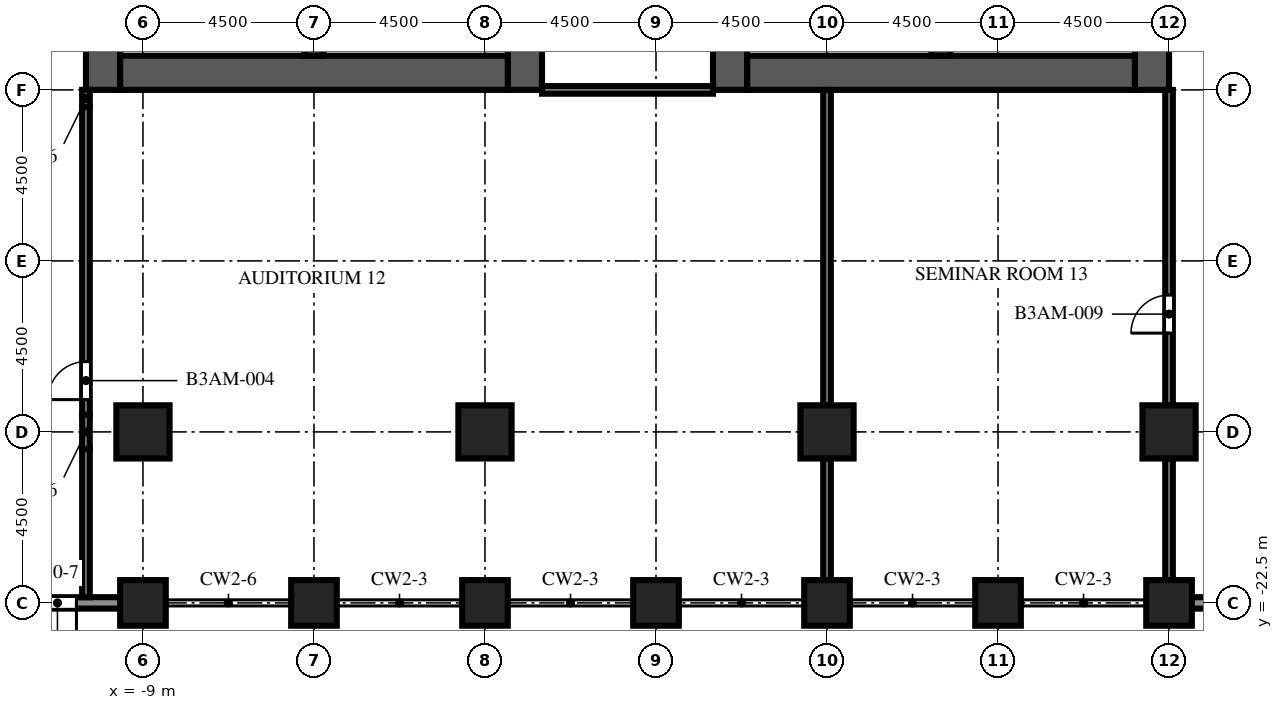
"""IFC4 building model, lengths in metres.
Left out: names, types, materials, properties, quantities, classifications, styles, units other than length and angle.
Written with IfcOpenShell. Run it as: python <this file> out.ifc"""

import sys

from ifc_helpers import new_model, si_unit, direction, frame, frame_2d, origin, origin_2d, place, context, subcontext, project, spatial, rectangle, extrude, element, fill, save


model = new_model("IFC4")
c1 = context("Model", 3, precision=1e-05, world=origin(), true_north=direction((0.0, 1.0)))
c2 = subcontext(c1, "Body", "Model", "MODEL_VIEW")
j1 = project(units=[si_unit("LENGTHUNIT", "METRE"), si_unit("PLANEANGLEUNIT", "RADIAN")], contexts=[c1])
p1 = place(None, origin())
s1 = spatial("IfcSite", under=j1, at=p1, CompositionType="ELEMENT")
p2 = place(p1, origin())
s2 = spatial("IfcBuilding", under=s1, at=p2, CompositionType="ELEMENT")
p3 = place(p2, frame((0.0, 0.0, 110.7)))
s3 = spatial("IfcBuildingStorey", under=s2, at=p3, CompositionType="ELEMENT", Elevation=110.7)
for number, where, z_axis, x_axis in (
    (1, (-9.0, -22.5, 0.0), (0.0, 0.0, 1.0), (1.0, 0.0, 0.0)),
    (2, (-4.5, -22.5, 0.0), (0.0, 0.0, 1.0), (1.0, 0.0, 0.0)),
    (3, (0.0, -22.5, 0.0), (0.0, 0.0, 1.0), (1.0, 0.0, 0.0)),
    (4, (4.5, -22.5, 0.0), (0.0, 0.0, 1.0), (1.0, 0.0, 0.0)),
    (5, (9.0, -22.5, 0.0), (0.0, 0.0, 1.0), (1.0, 0.0, 0.0)),
    (6, (13.5, -22.5, 0.0), (0.0, 0.0, 1.0), (1.0, 0.0, 0.0)),
    (7, (18.0, -22.5, 0.0), (0.0, 0.0, 1.0), (1.0, 0.0, 0.0)),
):
    element("IfcColumn", number, at=place(p3, frame(where, z_axis=z_axis, x_axis=x_axis)), inside=s3, PredefinedType="COLUMN", context=c2, shape_type="SweptSolid", body=[
        extrude(rectangle(XDim=1.2, YDim=1.2, at=origin_2d()), origin(), (0.0, 0.0, 1.0), 6.0),
    ])
p4 = place(p3, frame((-9.0, -18.0, 0.0), z_axis=(0.0, 0.0, 1.0), x_axis=(1.0, 0.0, 0.0)))
e8 = element("IfcColumn", 8, at=p4, inside=s3, PredefinedType="COLUMN", context=c2, shape_type="SweptSolid", body=[
    extrude(rectangle(XDim=1.4, YDim=1.4, at=origin_2d()), origin(), (0.0, 0.0, 1.0), 5.55),
])
for number, where, z_axis, x_axis in (
    (9, (0.0, -18.0, 0.0), (0.0, 0.0, 1.0), (1.0, 0.0, 0.0)),
    (10, (9.0, -18.0, 0.0), (0.0, 0.0, 1.0), (1.0, 0.0, 0.0)),
    (11, (18.0, -18.0, 0.0), (0.0, 0.0, 1.0), (1.0, 0.0, 0.0)),
):
    element("IfcColumn", number, at=place(p3, frame(where, z_axis=z_axis, x_axis=x_axis)), inside=s3, PredefinedType="COLUMN", context=c2, shape_type="SweptSolid", body=[
        extrude(rectangle(XDim=1.4, YDim=1.4, at=origin_2d()), origin(), (0.0, 0.0, 1.0), 6.0),
    ])
p5 = place(p3, frame((-10.05, -9.0, 0.0), z_axis=(0.0, 0.0, 1.0), x_axis=(0.0, 1.0, 0.0)))
e12 = element("IfcWall", 12, at=p5, inside=s3, PredefinedType="SHEAR", context=c2, shape_type="SweptSolid", body=[
    extrude(rectangle(XDim=27.5, YDim=0.9, at=frame_2d((13.75, 0.0))), origin(), (0.0, 0.0, 1.0), 6.0),
])
p6 = place(p5, frame((12.55, 0.0, 0.0)))
e13 = element("IfcOpeningElement", 13, at=p6, cuts=e12, PredefinedType="OPENING", context=c2, shape_type="SweptSolid", body=[
    extrude(rectangle(XDim=2.4, YDim=2.4, at=frame_2d((1.2, 1.2))), frame((0.0, 0.46, 0.0), z_axis=(0.0, -1.0, 0.0), x_axis=(1.0, 0.0, 0.0)), (0.0, 0.0, 1.0), 0.92),
])
p7 = place(p5, frame((6.825, 0.0, 0.0)))
e14 = element("IfcOpeningElement", 14, at=p7, cuts=e12, PredefinedType="OPENING", context=c2, shape_type="SweptSolid", body=[
    extrude(rectangle(XDim=1.2, YDim=2.1, at=frame_2d((0.6, 1.05))), frame((0.0, 0.46, 0.0), z_axis=(0.0, -1.0, 0.0), x_axis=(1.0, 0.0, 0.0)), (0.0, 0.0, 1.0), 0.92),
])
p8 = place(p5, frame((19.475, 0.0, 0.0)))
e15 = element("IfcOpeningElement", 15, at=p8, cuts=e12, PredefinedType="OPENING", context=c2, shape_type="SweptSolid", body=[
    extrude(rectangle(XDim=1.2, YDim=2.1, at=frame_2d((0.6, 1.05))), frame((0.0, 0.46, 0.0), z_axis=(0.0, -1.0, 0.0), x_axis=(1.0, 0.0, 0.0)), (0.0, 0.0, 1.0), 0.92),
])
p9 = place(p3, frame((1.05, -9.0, 0.0), z_axis=(0.0, 0.0, 1.0), x_axis=(0.0, 1.0, 0.0)))
e16 = element("IfcWall", 16, at=p9, inside=s3, PredefinedType="SHEAR", context=c2, shape_type="SweptSolid", body=[
    extrude(rectangle(XDim=27.5, YDim=0.9, at=frame_2d((13.75, 0.0))), origin(), (0.0, 0.0, 1.0), 6.0),
])
p10 = place(p9, frame((12.55, 0.0, 0.0)))
e17 = element("IfcOpeningElement", 17, at=p10, cuts=e16, PredefinedType="OPENING", context=c2, shape_type="SweptSolid", body=[
    extrude(rectangle(XDim=2.4, YDim=2.4, at=frame_2d((1.2, 1.2))), frame((0.0, 0.46, 0.0), z_axis=(0.0, -1.0, 0.0), x_axis=(1.0, 0.0, 0.0)), (0.0, 0.0, 1.0), 0.92),
])
p11 = place(p9, frame((3.975, 0.0, 0.0)))
e18 = element("IfcOpeningElement", 18, at=p11, cuts=e16, PredefinedType="OPENING", context=c2, shape_type="SweptSolid", body=[
    extrude(rectangle(XDim=1.2, YDim=2.1, at=frame_2d((0.6, 1.05))), frame((0.0, 0.46, 0.0), z_axis=(0.0, -1.0, 0.0), x_axis=(1.0, 0.0, 0.0)), (0.0, 0.0, 1.0), 0.92),
])
p12 = place(p9, frame((19.485, 0.0, 0.0)))
e19 = element("IfcOpeningElement", 19, at=p12, cuts=e16, PredefinedType="OPENING", context=c2, shape_type="SweptSolid", body=[
    extrude(rectangle(XDim=1.0, YDim=2.1, at=frame_2d((0.5, 1.05))), frame((0.0, 0.46, 0.0), z_axis=(0.0, -1.0, 0.0), x_axis=(1.0, 0.0, 0.0)), (0.0, 0.0, 1.0), 0.92),
])
p13 = place(p9, frame((21.139, 0.0, 0.0)))
e20 = element("IfcOpeningElement", 20, at=p13, cuts=e16, PredefinedType="OPENING", context=c2, shape_type="SweptSolid", body=[
    extrude(rectangle(XDim=1.0, YDim=2.1, at=frame_2d((0.5, 1.05))), frame((0.0, 0.46, 0.0), z_axis=(0.0, -1.0, 0.0), x_axis=(1.0, 0.0, 0.0)), (0.0, 0.0, 1.0), 0.92),
])
p14 = place(p9, frame((23.16, 0.0, 0.0)))
e21 = element("IfcOpeningElement", 21, at=p14, cuts=e16, PredefinedType="OPENING", context=c2, shape_type="SweptSolid", body=[
    extrude(rectangle(XDim=1.0, YDim=2.1, at=frame_2d((0.5, 1.05))), frame((0.0, 0.46, 0.0), z_axis=(0.0, -1.0, 0.0), x_axis=(1.0, 0.0, 0.0)), (0.0, 0.0, 1.0), 0.92),
])
p15 = place(p9, frame((25.181, 0.0, 0.0)))
e22 = element("IfcOpeningElement", 22, at=p15, cuts=e16, PredefinedType="OPENING", context=c2, shape_type="SweptSolid", body=[
    extrude(rectangle(XDim=1.0, YDim=2.1, at=frame_2d((0.5, 1.05))), frame((0.0, 0.46, 0.0), z_axis=(0.0, -1.0, 0.0), x_axis=(1.0, 0.0, 0.0)), (0.0, 0.0, 1.0), 0.92),
])
p16 = place(p3, frame((-9.6, -8.55, 0.0), z_axis=(0.0, 0.0, 1.0), x_axis=(1.0, 0.0, 0.0)))
e23 = element("IfcWall", 23, at=p16, inside=s3, PredefinedType="SHEAR", context=c2, shape_type="SweptSolid", body=[
    extrude(rectangle(XDim=10.2, YDim=0.9, at=frame_2d((5.1, 0.0))), origin(), (0.0, 0.0, 1.0), 6.0),
])
p17 = place(p3, frame((-4.5, -8.1, 0.0), z_axis=(0.0, 0.0, 1.0), x_axis=(0.0, 1.0, 0.0)))
e24 = element("IfcWall", 24, at=p17, inside=s3, PredefinedType="SHEAR", context=c2, shape_type="SweptSolid", body=[
    extrude(rectangle(XDim=7.35, YDim=0.5, at=frame_2d((3.675, 0.0))), origin(), (0.0, 0.0, 1.0), 6.0),
])
p18 = place(p3, frame((6.45, -9.0, 0.0), z_axis=(0.0, 0.0, 1.0), x_axis=(0.0, 1.0, 0.0)))
e25 = element("IfcWall", 25, at=p18, inside=s3, PredefinedType="SHEAR", context=c2, shape_type="SweptSolid", body=[
    extrude(rectangle(XDim=27.5, YDim=0.9, at=frame_2d((13.75, 0.0))), origin(), (0.0, 0.0, 1.0), 6.0),
])
p19 = place(p18, frame((12.55, 0.0, 0.0)))
e26 = element("IfcOpeningElement", 26, at=p19, cuts=e25, PredefinedType="OPENING", context=c2, shape_type="SweptSolid", body=[
    extrude(rectangle(XDim=2.4, YDim=2.4, at=frame_2d((1.2, 1.2))), frame((0.0, 0.46, 0.0), z_axis=(0.0, -1.0, 0.0), x_axis=(1.0, 0.0, 0.0)), (0.0, 0.0, 1.0), 0.92),
])
p20 = place(p18, frame((3.975, 0.0, 0.0)))
e27 = element("IfcOpeningElement", 27, at=p20, cuts=e25, PredefinedType="OPENING", context=c2, shape_type="SweptSolid", body=[
    extrude(rectangle(XDim=1.2, YDim=2.1, at=frame_2d((0.6, 1.05))), frame((0.0, 0.46, 0.0), z_axis=(0.0, -1.0, 0.0), x_axis=(1.0, 0.0, 0.0)), (0.0, 0.0, 1.0), 0.92),
])
p21 = place(p18, frame((19.485, 0.0, 0.0)))
e28 = element("IfcOpeningElement", 28, at=p21, cuts=e25, PredefinedType="OPENING", context=c2, shape_type="SweptSolid", body=[
    extrude(rectangle(XDim=1.0, YDim=2.1, at=frame_2d((0.5, 1.05))), frame((0.0, 0.46, 0.0), z_axis=(0.0, -1.0, 0.0), x_axis=(1.0, 0.0, 0.0)), (0.0, 0.0, 1.0), 0.92),
])
p22 = place(p18, frame((21.139, 0.0, 0.0)))
e29 = element("IfcOpeningElement", 29, at=p22, cuts=e25, PredefinedType="OPENING", context=c2, shape_type="SweptSolid", body=[
    extrude(rectangle(XDim=1.0, YDim=2.1, at=frame_2d((0.5, 1.05))), frame((0.0, 0.46, 0.0), z_axis=(0.0, -1.0, 0.0), x_axis=(1.0, 0.0, 0.0)), (0.0, 0.0, 1.0), 0.92),
])
p23 = place(p18, frame((23.16, 0.0, 0.0)))
e30 = element("IfcOpeningElement", 30, at=p23, cuts=e25, PredefinedType="OPENING", context=c2, shape_type="SweptSolid", body=[
    extrude(rectangle(XDim=1.0, YDim=2.1, at=frame_2d((0.5, 1.05))), frame((0.0, 0.46, 0.0), z_axis=(0.0, -1.0, 0.0), x_axis=(1.0, 0.0, 0.0)), (0.0, 0.0, 1.0), 0.92),
])
p24 = place(p18, frame((25.181, 0.0, 0.0)))
e31 = element("IfcOpeningElement", 31, at=p24, cuts=e25, PredefinedType="OPENING", context=c2, shape_type="SweptSolid", body=[
    extrude(rectangle(XDim=1.0, YDim=2.1, at=frame_2d((0.5, 1.05))), frame((0.0, 0.46, 0.0), z_axis=(0.0, -1.0, 0.0), x_axis=(1.0, 0.0, 0.0)), (0.0, 0.0, 1.0), 0.92),
])
p25 = place(p3, frame((17.55, -9.0, 0.0), z_axis=(0.0, 0.0, 1.0), x_axis=(0.0, 1.0, 0.0)))
e32 = element("IfcWall", 32, at=p25, inside=s3, PredefinedType="SHEAR", context=c2, shape_type="SweptSolid", body=[
    extrude(rectangle(XDim=27.5, YDim=0.9, at=frame_2d((13.75, 0.0))), origin(), (0.0, 0.0, 1.0), 6.0),
])
p26 = place(p25, frame((12.55, 0.0, 0.0)))
e33 = element("IfcOpeningElement", 33, at=p26, cuts=e32, PredefinedType="OPENING", context=c2, shape_type="SweptSolid", body=[
    extrude(rectangle(XDim=2.4, YDim=2.4, at=frame_2d((1.2, 1.2))), frame((0.0, 0.46, 0.0), z_axis=(0.0, -1.0, 0.0), x_axis=(1.0, 0.0, 0.0)), (0.0, 0.0, 1.0), 0.92),
])
p27 = place(p25, frame((6.825, 0.0, 0.0)))
e34 = element("IfcOpeningElement", 34, at=p27, cuts=e32, PredefinedType="OPENING", context=c2, shape_type="SweptSolid", body=[
    extrude(rectangle(XDim=1.2, YDim=2.1, at=frame_2d((0.6, 1.05))), frame((0.0, 0.46, 0.0), z_axis=(0.0, -1.0, 0.0), x_axis=(1.0, 0.0, 0.0)), (0.0, 0.0, 1.0), 0.92),
])
p28 = place(p25, frame((19.475, 0.0, 0.0)))
e35 = element("IfcOpeningElement", 35, at=p28, cuts=e32, PredefinedType="OPENING", context=c2, shape_type="SweptSolid", body=[
    extrude(rectangle(XDim=1.2, YDim=2.1, at=frame_2d((0.6, 1.05))), frame((0.0, 0.46, 0.0), z_axis=(0.0, -1.0, 0.0), x_axis=(1.0, 0.0, 0.0)), (0.0, 0.0, 1.0), 0.92),
])
p29 = place(p3, frame((6.9, -8.55, 0.0), z_axis=(0.0, 0.0, 1.0), x_axis=(1.0, 0.0, 0.0)))
e36 = element("IfcWall", 36, at=p29, inside=s3, PredefinedType="SHEAR", context=c2, shape_type="SweptSolid", body=[
    extrude(rectangle(XDim=10.2, YDim=0.9, at=frame_2d((5.1, 0.0))), origin(), (0.0, 0.0, 1.0), 6.0),
])
p30 = place(p3, frame((12.0, -8.1, 0.0), z_axis=(0.0, 0.0, 1.0), x_axis=(0.0, 1.0, 0.0)))
e37 = element("IfcWall", 37, at=p30, inside=s3, PredefinedType="SHEAR", context=c2, shape_type="SweptSolid", body=[
    extrude(rectangle(XDim=7.35, YDim=0.5, at=frame_2d((3.675, 0.0))), origin(), (0.0, 0.0, 1.0), 6.0),
])
p31 = place(p3, frame((-9.6, -22.5, 0.0), z_axis=(0.0, 0.0, 1.0), x_axis=(-1.0, 0.0, 0.0)))
e38 = element("IfcWall", 38, at=p31, inside=s3, PredefinedType="SOLIDWALL", context=c2, shape_type="SweptSolid", body=[
    extrude(rectangle(XDim=3.3, YDim=0.3, at=frame_2d((1.65, 0.0))), origin(), (0.0, 0.0, 1.0), 4.65),
])
p32 = place(p31, frame((1.15, 0.0, 0.0)))
e39 = element("IfcOpeningElement", 39, at=p32, cuts=e38, PredefinedType="OPENING", context=c2, shape_type="SweptSolid", body=[
    extrude(rectangle(XDim=1.0, YDim=2.2, at=frame_2d((0.5, 1.1))), frame((0.0, 0.16, 0.0), z_axis=(0.0, -1.0, 0.0), x_axis=(1.0, 0.0, 0.0)), (0.0, 0.0, 1.0), 0.32),
])
p33 = place(p3, frame((21.9, -22.5, 0.0), z_axis=(0.0, 0.0, 1.0), x_axis=(-1.0, 0.0, 0.0)))
e40 = element("IfcWall", 40, at=p33, inside=s3, PredefinedType="SOLIDWALL", context=c2, shape_type="SweptSolid", body=[
    extrude(rectangle(XDim=3.3, YDim=0.3, at=frame_2d((1.65, 0.0))), origin(), (0.0, 0.0, 1.0), 4.65),
])
p34 = place(p33, frame((1.15, 0.0, 0.0)))
e41 = element("IfcOpeningElement", 41, at=p34, cuts=e40, PredefinedType="OPENING", context=c2, shape_type="SweptSolid", body=[
    extrude(rectangle(XDim=1.0, YDim=2.2, at=frame_2d((0.5, 1.1))), frame((0.0, 0.16, 0.0), z_axis=(0.0, -1.0, 0.0), x_axis=(1.0, 0.0, 0.0)), (0.0, 0.0, 1.0), 0.32),
])
p35 = place(p3, frame((-10.5, -22.35, 0.0), z_axis=(0.0, 0.0, 1.0), x_axis=(0.0, 1.0, 0.0)))
e42 = element("IfcWall", 42, at=p35, inside=s3, PredefinedType="PARTITIONING", context=c2, shape_type="SweptSolid", body=[
    extrude(rectangle(XDim=3.9, YDim=0.2, at=frame_2d((1.95, 0.0))), origin(), (0.0, 0.0, 1.0), 5.55),
])
p36 = place(p3, frame((-10.5, -18.45, 0.0), z_axis=(0.0, 0.0, 1.0), x_axis=(0.0, 1.0, 0.0)))
e43 = element("IfcWall", 43, at=p36, inside=s3, PredefinedType="PARTITIONING", context=c2, shape_type="SweptSolid", body=[
    extrude(rectangle(XDim=0.9, YDim=0.2, at=frame_2d((0.45, 0.0))), origin(), (0.0, 0.0, 1.0), 3.72),
])
p37 = place(p3, frame((-10.5, -9.45, 0.0), z_axis=(0.0, 0.0, 1.0), x_axis=(0.0, -1.0, 0.0)))
e44 = element("IfcWall", 44, at=p37, inside=s3, PredefinedType="PARTITIONING", context=c2, shape_type="SweptSolid", body=[
    extrude(rectangle(XDim=8.1, YDim=0.2, at=frame_2d((4.05, 0.0))), origin(), (0.0, 0.0, 1.0), 5.55),
])
p38 = place(p37, frame((6.7, 0.0, 0.0)))
e45 = element("IfcOpeningElement", 45, at=p38, cuts=e44, PredefinedType="OPENING", context=c2, shape_type="SweptSolid", body=[
    extrude(rectangle(XDim=1.0, YDim=2.1, at=frame_2d((0.5, 1.05))), frame((0.0, 0.11, 0.0), z_axis=(0.0, -1.0, 0.0), x_axis=(1.0, 0.0, 0.0)), (0.0, 0.0, 1.0), 0.22),
])
p39 = place(p3, frame((-10.5, -9.45, 0.0), z_axis=(0.0, 0.0, 1.0), x_axis=(0.0, 1.0, 0.0)))
e46 = element("IfcWall", 46, at=p39, inside=s3, PredefinedType="PARTITIONING", context=c2, shape_type="SweptSolid", body=[
    extrude(rectangle(XDim=0.45, YDim=0.2, at=frame_2d((0.225, 0.0))), origin(), (0.0, 0.0, 1.0), 3.72),
])
p40 = place(p3, frame((9.0, -21.9, 0.0), z_axis=(0.0, 0.0, 1.0), x_axis=(0.0, 1.0, 0.0)))
e47 = element("IfcWall", 47, at=p40, inside=s3, PredefinedType="PARTITIONING", context=c2, shape_type="SweptSolid", body=[
    extrude(rectangle(XDim=3.2, YDim=0.2, at=frame_2d((1.6, 0.0))), origin(), (0.0, 0.0, 1.0), 5.55),
])
p41 = place(p3, frame((9.0, -17.3, 0.0), z_axis=(0.0, 0.0, 1.0), x_axis=(0.0, 1.0, 0.0)))
e48 = element("IfcWall", 48, at=p41, inside=s3, PredefinedType="PARTITIONING", context=c2, shape_type="SweptSolid", body=[
    extrude(rectangle(XDim=8.3, YDim=0.2, at=frame_2d((4.15, 0.0))), origin(), (0.0, 0.0, 1.0), 5.55),
])
p42 = place(p3, frame((18.0, -21.9, 0.0), z_axis=(0.0, 0.0, 1.0), x_axis=(0.0, 1.0, 0.0)))
e49 = element("IfcWall", 49, at=p42, inside=s3, PredefinedType="PARTITIONING", context=c2, shape_type="SweptSolid", body=[
    extrude(rectangle(XDim=3.2, YDim=0.2, at=frame_2d((1.6, 0.0))), origin(), (0.0, 0.0, 1.0), 5.55),
])
p43 = place(p3, frame((18.0, -17.3, 0.0), z_axis=(0.0, 0.0, 1.0), x_axis=(0.0, 1.0, 0.0)))
e50 = element("IfcWall", 50, at=p43, inside=s3, PredefinedType="PARTITIONING", context=c2, shape_type="SweptSolid", body=[
    extrude(rectangle(XDim=8.3, YDim=0.2, at=frame_2d((4.15, 0.0))), origin(), (0.0, 0.0, 1.0), 5.55),
])
p44 = place(p43, frame((1.9, 0.0, 0.0)))
e51 = element("IfcOpeningElement", 51, at=p44, cuts=e50, PredefinedType="OPENING", context=c2, shape_type="SweptSolid", body=[
    extrude(rectangle(XDim=1.0, YDim=2.1, at=frame_2d((0.5, 1.05))), frame((0.0, 0.11, 0.0), z_axis=(0.0, -1.0, 0.0), x_axis=(1.0, 0.0, 0.0)), (0.0, 0.0, 1.0), 0.22),
])
p45 = place(p3, frame((1.5, -9.0, 0.0), z_axis=(0.0, 0.0, 1.0), x_axis=(1.0, 0.0, 0.0)))
e52 = element("IfcWall", 52, at=p45, inside=s3, PredefinedType="PARTITIONING", context=c2, shape_type="SweptSolid", body=[
    extrude(rectangle(XDim=4.5, YDim=0.2, at=frame_2d((2.25, 0.0))), origin(), (0.0, 0.0, 1.0), 5.55),
])
p46 = place(p32, origin())
e53 = element("IfcDoor", 53, at=p46, inside=s3, OperationType="SINGLE_SWING_LEFT", PredefinedType="DOOR", context=c2, shape_type="SweptSolid", body=[
    extrude(rectangle(XDim=1.0, YDim=2.2, at=frame_2d((0.5, 1.1))), frame((0.0, 0.025, 0.0), z_axis=(0.0, -1.0, 0.0), x_axis=(1.0, 0.0, 0.0)), (0.0, 0.0, 1.0), 0.05),
])
fill(e39, e53)
p47 = place(p38, origin())
e54 = element("IfcDoor", 54, at=p47, inside=s3, OperationType="SINGLE_SWING_RIGHT", PredefinedType="DOOR", context=c2, shape_type="SweptSolid", body=[
    extrude(rectangle(XDim=1.0, YDim=2.1, at=frame_2d((0.5, 1.05))), frame((0.0, 0.025, 0.0), z_axis=(0.0, -1.0, 0.0), x_axis=(1.0, 0.0, 0.0)), (0.0, 0.0, 1.0), 0.05),
])
fill(e45, e54)
p48 = place(p44, origin())
e55 = element("IfcDoor", 55, at=p48, inside=s3, OperationType="SINGLE_SWING_LEFT", PredefinedType="DOOR", context=c2, shape_type="SweptSolid", body=[
    extrude(rectangle(XDim=1.0, YDim=2.1, at=frame_2d((0.5, 1.05))), frame((0.0, 0.025, 0.0), z_axis=(0.0, -1.0, 0.0), x_axis=(1.0, 0.0, 0.0)), (0.0, 0.0, 1.0), 0.05),
])
fill(e51, e55)
save(model, sys.argv[1])
